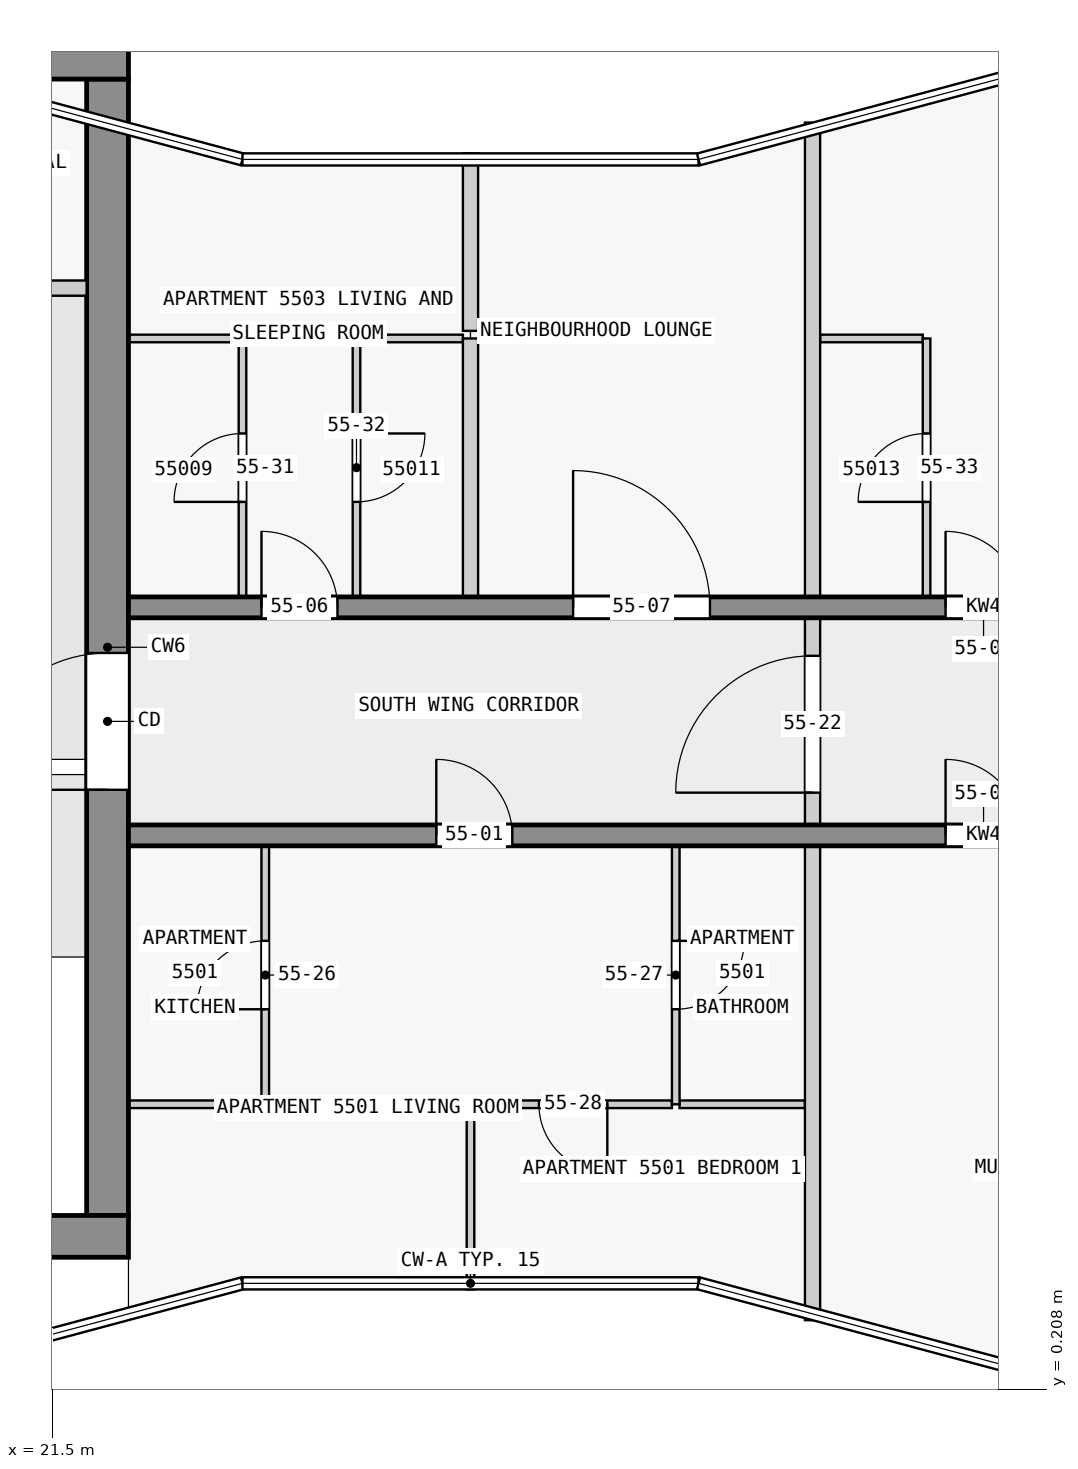
"""IFC4 building model, lengths in metres.
Left out: names, types, materials, properties, quantities, classifications, styles, units other than length and angle.
Written with IfcOpenShell. Run it as: python <this file> out.ifc"""

import sys

from ifc_helpers import new_model, si_unit, direction, frame, frame_2d, origin, place, context, subcontext, project, spatial, rectangle, extrude, element, fill, save


model = new_model("IFC4")
c1 = context("Model", 3, precision=1e-05, world=origin(), true_north=direction((0.0, 1.0)))
c2 = subcontext(c1, "Body", "Model", "MODEL_VIEW")
j1 = project(units=[si_unit("LENGTHUNIT", "METRE"), si_unit("PLANEANGLEUNIT", "RADIAN")], contexts=[c1])
p1 = place(None, origin())
s1 = spatial("IfcSite", under=j1, at=p1, CompositionType="ELEMENT")
p2 = place(p1, origin())
s2 = spatial("IfcBuilding", under=s1, at=p2, CompositionType="ELEMENT")
p3 = place(p2, frame((0.0, 0.0, 211.9)))
s3 = spatial("IfcBuildingStorey", under=s2, at=p3, CompositionType="ELEMENT", Elevation=211.9)
p4 = place(p3, frame((1.75, 2.225, 0.0), z_axis=(0.0, 0.0, 1.0), x_axis=(1.0, 0.0, 0.0)))
e1 = element("IfcWall", 1, at=p4, inside=s3, PredefinedType="SHEAR", context=c2, shape_type="SweptSolid", body=[
    extrude(rectangle(XDim=20.75, YDim=0.55, at=frame_2d((10.375, 0.0))), origin(), (0.0, 0.0, 1.0), 3.25),
])
p5 = place(p3, frame((1.38, 17.725, 0.0), z_axis=(0.0, 0.0, 1.0), x_axis=(1.0, 0.0, 0.0)))
e2 = element("IfcWall", 2, at=p5, inside=s3, PredefinedType="SHEAR", context=c2, shape_type="SweptSolid", body=[
    extrude(rectangle(XDim=21.12, YDim=0.55, at=frame_2d((10.56, 0.0))), origin(), (0.0, 0.0, 1.0), 3.25),
])
p6 = place(p5, frame((6.35, 0.0, 0.0)))
e3 = element("IfcOpeningElement", 3, at=p6, cuts=e2, PredefinedType="OPENING", context=c2, shape_type="SweptSolid", body=[
    extrude(rectangle(XDim=1.8, YDim=2.1, at=frame_2d((0.9, 1.05))), frame((0.0, 0.285, 0.0), z_axis=(0.0, -1.0, 0.0), x_axis=(1.0, 0.0, 0.0)), (0.0, 0.0, 1.0), 0.57),
])
p7 = place(p3, frame((22.225, 2.5, 0.0), z_axis=(0.0, 0.0, 1.0), x_axis=(0.0, 1.0, 0.0)))
e4 = element("IfcWall", 4, at=p7, inside=s3, PredefinedType="SHEAR", context=c2, shape_type="SweptSolid", body=[
    extrude(rectangle(XDim=14.95, YDim=0.55, at=frame_2d((7.475, 0.0))), origin(), (0.0, 0.0, 1.0), 3.25),
])
p8 = place(p7, frame((5.6, 0.0, 0.0)))
e5 = element("IfcOpeningElement", 5, at=p8, cuts=e4, PredefinedType="OPENING", context=c2, shape_type="SweptSolid", body=[
    extrude(rectangle(XDim=1.8, YDim=2.1, at=frame_2d((0.9, 1.05))), frame((0.0, 0.285, 0.0), z_axis=(0.0, -1.0, 0.0), x_axis=(1.0, 0.0, 0.0)), (0.0, 0.0, 1.0), 0.57),
])
p9 = place(p3, frame((22.5, 7.5, 0.0), z_axis=(0.0, 0.0, 1.0), x_axis=(1.0, 0.0, 0.0)))
e6 = element("IfcWall", 6, at=p9, inside=s3, PredefinedType="SHEAR", context=c2, shape_type="SweptSolid", body=[
    extrude(rectangle(XDim=22.5, YDim=0.275, at=frame_2d((11.25, 0.0))), origin(), (0.0, 0.0, 1.0), 3.25),
])
p10 = place(p9, frame((4.05, 0.0, 0.0)))
e7 = element("IfcOpeningElement", 7, at=p10, cuts=e6, PredefinedType="OPENING", context=c2, shape_type="SweptSolid", body=[
    extrude(rectangle(XDim=1.0, YDim=2.1, at=frame_2d((0.5, 1.05))), frame((0.0, 0.147, 0.0), z_axis=(0.0, -1.0, 0.0), x_axis=(1.0, 0.0, 0.0)), (0.0, 0.0, 1.0), 0.295),
])
p11 = place(p9, frame((10.75, 0.0, 0.0)))
e8 = element("IfcOpeningElement", 8, at=p11, cuts=e6, PredefinedType="OPENING", context=c2, shape_type="SweptSolid", body=[
    extrude(rectangle(XDim=1.0, YDim=2.1, at=frame_2d((0.5, 1.05))), frame((0.0, 0.147, 0.0), z_axis=(0.0, -1.0, 0.0), x_axis=(1.0, 0.0, 0.0)), (0.0, 0.0, 1.0), 0.295),
])
p12 = place(p9, frame((15.25, 0.0, 0.0)))
e9 = element("IfcOpeningElement", 9, at=p12, cuts=e6, PredefinedType="OPENING", context=c2, shape_type="SweptSolid", body=[
    extrude(rectangle(XDim=1.0, YDim=2.1, at=frame_2d((0.5, 1.05))), frame((0.0, 0.147, 0.0), z_axis=(0.0, -1.0, 0.0), x_axis=(1.0, 0.0, 0.0)), (0.0, 0.0, 1.0), 0.295),
])
p13 = place(p9, frame((18.75, 0.0, 0.0)))
e10 = element("IfcOpeningElement", 10, at=p13, cuts=e6, PredefinedType="OPENING", context=c2, shape_type="SweptSolid", body=[
    extrude(rectangle(XDim=0.9, YDim=2.1, at=frame_2d((0.45, 1.05))), frame((0.0, 0.147, 0.0), z_axis=(0.0, -1.0, 0.0), x_axis=(1.0, 0.0, 0.0)), (0.0, 0.0, 1.0), 0.295),
])
p14 = place(p9, frame((20.95, 0.0, 0.0)))
e11 = element("IfcOpeningElement", 11, at=p14, cuts=e6, PredefinedType="OPENING", context=c2, shape_type="SweptSolid", body=[
    extrude(rectangle(XDim=1.0, YDim=2.1, at=frame_2d((0.5, 1.05))), frame((0.0, 0.147, 0.0), z_axis=(0.0, -1.0, 0.0), x_axis=(1.0, 0.0, 0.0)), (0.0, 0.0, 1.0), 0.295),
])
p15 = place(p3, frame((22.5, 10.5, 0.0), z_axis=(0.0, 0.0, 1.0), x_axis=(1.0, 0.0, 0.0)))
e12 = element("IfcWall", 12, at=p15, inside=s3, PredefinedType="SHEAR", context=c2, shape_type="SweptSolid", body=[
    extrude(rectangle(XDim=22.5, YDim=0.275, at=frame_2d((11.25, 0.0))), origin(), (0.0, 0.0, 1.0), 3.25),
])
p16 = place(p15, frame((1.75, 0.0, 0.0)))
e13 = element("IfcOpeningElement", 13, at=p16, cuts=e12, PredefinedType="OPENING", context=c2, shape_type="SweptSolid", body=[
    extrude(rectangle(XDim=1.0, YDim=2.1, at=frame_2d((0.5, 1.05))), frame((0.0, 0.147, 0.0), z_axis=(0.0, -1.0, 0.0), x_axis=(1.0, 0.0, 0.0)), (0.0, 0.0, 1.0), 0.295),
])
p17 = place(p15, frame((5.85, 0.0, 0.0)))
e14 = element("IfcOpeningElement", 14, at=p17, cuts=e12, PredefinedType="OPENING", context=c2, shape_type="SweptSolid", body=[
    extrude(rectangle(XDim=1.8, YDim=2.1, at=frame_2d((0.9, 1.05))), frame((0.0, 0.147, 0.0), z_axis=(0.0, -1.0, 0.0), x_axis=(1.0, 0.0, 0.0)), (0.0, 0.0, 1.0), 0.295),
])
p18 = place(p15, frame((10.75, 0.0, 0.0)))
e15 = element("IfcOpeningElement", 15, at=p18, cuts=e12, PredefinedType="OPENING", context=c2, shape_type="SweptSolid", body=[
    extrude(rectangle(XDim=1.0, YDim=2.1, at=frame_2d((0.5, 1.05))), frame((0.0, 0.147, 0.0), z_axis=(0.0, -1.0, 0.0), x_axis=(1.0, 0.0, 0.0)), (0.0, 0.0, 1.0), 0.295),
])
p19 = place(p15, frame((16.85, 0.0, 0.0)))
e16 = element("IfcOpeningElement", 16, at=p19, cuts=e12, PredefinedType="OPENING", context=c2, shape_type="SweptSolid", body=[
    extrude(rectangle(XDim=1.0, YDim=2.1, at=frame_2d((0.5, 1.05))), frame((0.0, 0.147, 0.0), z_axis=(0.0, -1.0, 0.0), x_axis=(1.0, 0.0, 0.0)), (0.0, 0.0, 1.0), 0.295),
])
p20 = place(p3, frame((18.6, 14.7, 0.0), z_axis=(0.0, 0.0, 1.0), x_axis=(1.0, 0.0, 0.0)))
e17 = element("IfcWall", 17, at=p20, inside=s3, PredefinedType="PARTITIONING", context=c2, shape_type="SweptSolid", body=[
    extrude(rectangle(XDim=3.35, YDim=0.2, at=frame_2d((1.675, 0.0))), origin(), (0.0, 0.0, 1.0), 3.25),
])
p21 = place(p20, frame((0.15, 0.0, 0.0)))
e18 = element("IfcOpeningElement", 18, at=p21, cuts=e17, PredefinedType="OPENING", context=c2, shape_type="SweptSolid", body=[
    extrude(rectangle(XDim=0.9, YDim=2.1, at=frame_2d((0.45, 1.05))), frame((0.0, 0.11, 0.0), z_axis=(0.0, -1.0, 0.0), x_axis=(1.0, 0.0, 0.0)), (0.0, 0.0, 1.0), 0.22),
])
p22 = place(p20, frame((1.825, 0.0, 0.0)))
e19 = element("IfcOpeningElement", 19, at=p22, cuts=e17, PredefinedType="OPENING", context=c2, shape_type="SweptSolid", body=[
    extrude(rectangle(XDim=0.9, YDim=2.1, at=frame_2d((0.45, 1.05))), frame((0.0, 0.11, 0.0), z_axis=(0.0, -1.0, 0.0), x_axis=(1.0, 0.0, 0.0)), (0.0, 0.0, 1.0), 0.22),
])
p23 = place(p3, frame((29.65, 3.962, 0.0), z_axis=(0.0, 0.0, 1.0), x_axis=(-1.0, 0.0, 0.0)))
e20 = element("IfcWall", 20, at=p23, inside=s3, PredefinedType="PARTITIONING", context=c2, shape_type="SweptSolid", body=[
    extrude(rectangle(XDim=2.65, YDim=0.1, at=frame_2d((1.325, 0.0))), origin(), (0.0, 0.0, 1.0), 3.25),
])
p24 = place(p23, frame((0.85, 0.0, 0.0)))
e21 = element("IfcOpeningElement", 21, at=p24, cuts=e20, PredefinedType="OPENING", context=c2, shape_type="SweptSolid", body=[
    extrude(rectangle(XDim=0.9, YDim=2.1, at=frame_2d((0.45, 1.05))), frame((0.0, 0.06, 0.0), z_axis=(0.0, -1.0, 0.0), x_axis=(1.0, 0.0, 0.0)), (0.0, 0.0, 1.0), 0.12),
])
p25 = place(p3, frame((22.5, 3.962, 0.0), z_axis=(0.0, 0.0, 1.0), x_axis=(1.0, 0.0, 0.0)))
e22 = element("IfcWall", 22, at=p25, inside=s3, PredefinedType="PARTITIONING", context=c2, shape_type="SweptSolid", body=[
    extrude(rectangle(XDim=1.75, YDim=0.1, at=frame_2d((0.875, 0.0))), origin(), (0.0, 0.0, 1.0), 3.25),
])
p26 = place(p3, frame((29.75, 3.962, 0.0), z_axis=(0.0, 0.0, 1.0), x_axis=(1.0, 0.0, 0.0)))
e23 = element("IfcWall", 23, at=p26, inside=s3, PredefinedType="PARTITIONING", context=c2, shape_type="SweptSolid", body=[
    extrude(rectangle(XDim=1.65, YDim=0.1, at=frame_2d((0.825, 0.0))), origin(), (0.0, 0.0, 1.0), 3.25),
])
p27 = place(p3, frame((23.95, 14.038, 0.0), z_axis=(0.0, 0.0, 1.0), x_axis=(-1.0, 0.0, 0.0)))
e24 = element("IfcWall", 24, at=p27, inside=s3, PredefinedType="PARTITIONING", context=c2, shape_type="SweptSolid", body=[
    extrude(rectangle(XDim=1.45, YDim=0.1, at=frame_2d((0.725, 0.0))), origin(), (0.0, 0.0, 1.0), 3.25),
])
for number, where, z_axis, x_axis in (
    (25, (26.9, 14.038, 0.0), (0.0, 0.0, 1.0), (-1.0, 0.0, 0.0)),
    (26, (32.95, 14.038, 0.0), (0.0, 0.0, 1.0), (-1.0, 0.0, 0.0)),
):
    element("IfcWall", number, at=place(p3, frame(where, z_axis=z_axis, x_axis=x_axis)), inside=s3, PredefinedType="PARTITIONING", context=c2, shape_type="SweptSolid", body=[
        extrude(rectangle(XDim=1.35, YDim=0.1, at=frame_2d((0.675, 0.0))), origin(), (0.0, 0.0, 1.0), 3.25),
    ])
p28 = place(p3, frame((24.0, 10.637, 0.0), z_axis=(0.0, 0.0, 1.0), x_axis=(0.0, 1.0, 0.0)))
e27 = element("IfcWall", 27, at=p28, inside=s3, PredefinedType="PARTITIONING", context=c2, shape_type="SweptSolid", body=[
    extrude(rectangle(XDim=3.4, YDim=0.1, at=frame_2d((1.7, 0.0))), origin(), (0.0, 0.0, 1.0), 3.25),
])
p29 = place(p28, frame((1.25, 0.0, 0.0)))
e28 = element("IfcOpeningElement", 28, at=p29, cuts=e27, PredefinedType="OPENING", context=c2, shape_type="SweptSolid", body=[
    extrude(rectangle(XDim=0.9, YDim=2.1, at=frame_2d((0.45, 1.05))), frame((0.0, 0.06, 0.0), z_axis=(0.0, -1.0, 0.0), x_axis=(1.0, 0.0, 0.0)), (0.0, 0.0, 1.0), 0.12),
])
p30 = place(p3, frame((24.3, 3.962, 0.0), z_axis=(0.0, 0.0, 1.0), x_axis=(0.0, 1.0, 0.0)))
e29 = element("IfcWall", 29, at=p30, inside=s3, PredefinedType="PARTITIONING", context=c2, shape_type="SweptSolid", body=[
    extrude(rectangle(XDim=3.4, YDim=0.1, at=frame_2d((1.7, 0.0))), origin(), (0.0, 0.0, 1.0), 3.25),
])
p31 = place(p30, frame((1.25, 0.0, 0.0)))
e30 = element("IfcOpeningElement", 30, at=p31, cuts=e29, PredefinedType="OPENING", context=c2, shape_type="SweptSolid", body=[
    extrude(rectangle(XDim=0.9, YDim=2.1, at=frame_2d((0.45, 1.05))), frame((0.0, 0.06, 0.0), z_axis=(0.0, -1.0, 0.0), x_axis=(1.0, 0.0, 0.0)), (0.0, 0.0, 1.0), 0.12),
])
p32 = place(p3, frame((25.5, 14.038, 0.0), z_axis=(0.0, 0.0, 1.0), x_axis=(0.0, -1.0, 0.0)))
e31 = element("IfcWall", 31, at=p32, inside=s3, PredefinedType="PARTITIONING", context=c2, shape_type="SweptSolid", body=[
    extrude(rectangle(XDim=3.4, YDim=0.1, at=frame_2d((1.7, 0.0))), origin(), (0.0, 0.0, 1.0), 3.25),
])
p33 = place(p32, frame((1.25, 0.0, 0.0)))
e32 = element("IfcOpeningElement", 32, at=p33, cuts=e31, PredefinedType="OPENING", context=c2, shape_type="SweptSolid", body=[
    extrude(rectangle(XDim=0.9, YDim=2.1, at=frame_2d((0.45, 1.05))), frame((0.0, 0.06, 0.0), z_axis=(0.0, -1.0, 0.0), x_axis=(1.0, 0.0, 0.0)), (0.0, 0.0, 1.0), 0.12),
])
p34 = place(p3, frame((27.0, 3.913, 0.0), z_axis=(0.0, 0.0, 1.0), x_axis=(0.0, -1.0, 0.0)))
e33 = element("IfcWall", 33, at=p34, inside=s3, PredefinedType="PARTITIONING", context=c2, shape_type="SweptSolid", body=[
    extrude(rectangle(XDim=2.386, YDim=0.1, at=frame_2d((1.193, 0.0))), origin(), (0.0, 0.0, 1.0), 3.25),
])
p35 = place(p3, frame((27.0, 16.473, 0.0), z_axis=(0.0, 0.0, 1.0), x_axis=(0.0, -1.0, 0.0)))
e34 = element("IfcWall", 34, at=p35, inside=s3, PredefinedType="PARTITIONING", context=c2, shape_type="SweptSolid", body=[
    extrude(rectangle(XDim=2.336, YDim=0.2, at=frame_2d((1.168, 0.0))), origin(), (0.0, 0.0, 1.0), 3.25),
])
p36 = place(p3, frame((27.0, 10.637, 0.0), z_axis=(0.0, 0.0, 1.0), x_axis=(0.0, 1.0, 0.0)))
e35 = element("IfcWall", 35, at=p36, inside=s3, PredefinedType="PARTITIONING", context=c2, shape_type="SweptSolid", body=[
    extrude(rectangle(XDim=3.4, YDim=0.2, at=frame_2d((1.7, 0.0))), origin(), (0.0, 0.0, 1.0), 3.25),
])
p37 = place(p3, frame((29.7, 7.363, 0.0), z_axis=(0.0, 0.0, 1.0), x_axis=(0.0, -1.0, 0.0)))
e36 = element("IfcWall", 36, at=p37, inside=s3, PredefinedType="PARTITIONING", context=c2, shape_type="SweptSolid", body=[
    extrude(rectangle(XDim=3.4, YDim=0.1, at=frame_2d((1.7, 0.0))), origin(), (0.0, 0.0, 1.0), 3.25),
])
p38 = place(p37, frame((1.25, 0.0, 0.0)))
e37 = element("IfcOpeningElement", 37, at=p38, cuts=e36, PredefinedType="OPENING", context=c2, shape_type="SweptSolid", body=[
    extrude(rectangle(XDim=0.9, YDim=2.1, at=frame_2d((0.45, 1.05))), frame((0.0, 0.06, 0.0), z_axis=(0.0, -1.0, 0.0), x_axis=(1.0, 0.0, 0.0)), (0.0, 0.0, 1.0), 0.12),
])
for number, where, z_axis, x_axis in (
    (38, (31.5, 1.122, 0.0), (0.0, 0.0, 1.0), (0.0, 1.0, 0.0)),
    (39, (31.5, 10.637, 0.0), (0.0, 0.0, 1.0), (0.0, 1.0, 0.0)),
):
    element("IfcWall", number, at=place(p3, frame(where, z_axis=z_axis, x_axis=x_axis)), inside=s3, PredefinedType="PARTITIONING", context=c2, shape_type="SweptSolid", body=[
        extrude(rectangle(XDim=6.24, YDim=0.2, at=frame_2d((3.12, 0.0))), origin(), (0.0, 0.0, 1.0), 3.25),
    ])
p39 = place(p3, frame((33.0, 10.637, 0.0), z_axis=(0.0, 0.0, 1.0), x_axis=(0.0, 1.0, 0.0)))
e40 = element("IfcWall", 40, at=p39, inside=s3, PredefinedType="PARTITIONING", context=c2, shape_type="SweptSolid", body=[
    extrude(rectangle(XDim=3.4, YDim=0.1, at=frame_2d((1.7, 0.0))), origin(), (0.0, 0.0, 1.0), 3.25),
])
p40 = place(p39, frame((1.25, 0.0, 0.0)))
e41 = element("IfcOpeningElement", 41, at=p40, cuts=e40, PredefinedType="OPENING", context=c2, shape_type="SweptSolid", body=[
    extrude(rectangle(XDim=0.9, YDim=2.1, at=frame_2d((0.45, 1.05))), frame((0.0, 0.06, 0.0), z_axis=(0.0, -1.0, 0.0), x_axis=(1.0, 0.0, 0.0)), (0.0, 0.0, 1.0), 0.12),
])
p41 = place(p3, frame((31.5, 7.462, 0.0), z_axis=(0.0, 0.0, 1.0), x_axis=(0.0, 1.0, 0.0)))
e42 = element("IfcWall", 42, at=p41, inside=s3, PredefinedType="PARTITIONING", context=c2, shape_type="SweptSolid", body=[
    extrude(rectangle(XDim=3.075, YDim=0.2, at=frame_2d((1.538, 0.0))), origin(), (0.0, 0.0, 1.0), 3.25),
])
p42 = place(p41, frame((0.6, 0.0, 0.0)))
e43 = element("IfcOpeningElement", 43, at=p42, cuts=e42, PredefinedType="OPENING", context=c2, shape_type="SweptSolid", body=[
    extrude(rectangle(XDim=1.8, YDim=2.1, at=frame_2d((0.9, 1.05))), frame((0.0, 0.11, 0.0), z_axis=(0.0, -1.0, 0.0), x_axis=(1.0, 0.0, 0.0)), (0.0, 0.0, 1.0), 0.22),
])
p43 = place(p8, origin())
e44 = element("IfcDoor", 44, at=p43, inside=s3, OperationType="DOUBLE_DOOR_SINGLE_SWING", PredefinedType="DOOR", context=c2, shape_type="SweptSolid", body=[
    extrude(rectangle(XDim=1.8, YDim=2.1, at=frame_2d((0.9, 1.05))), frame((0.0, 0.025, 0.0), z_axis=(0.0, -1.0, 0.0), x_axis=(1.0, 0.0, 0.0)), (0.0, 0.0, 1.0), 0.05),
])
fill(e5, e44)
p44 = place(p10, origin())
e45 = element("IfcDoor", 45, at=p44, inside=s3, OperationType="SINGLE_SWING_LEFT", PredefinedType="DOOR", context=c2, shape_type="SweptSolid", body=[
    extrude(rectangle(XDim=1.0, YDim=2.1, at=frame_2d((0.5, 1.05))), frame((0.0, 0.025, 0.0), z_axis=(0.0, -1.0, 0.0), x_axis=(1.0, 0.0, 0.0)), (0.0, 0.0, 1.0), 0.05),
])
fill(e7, e45)
p45 = place(p11, origin())
e46 = element("IfcDoor", 46, at=p45, inside=s3, OperationType="SINGLE_SWING_LEFT", PredefinedType="DOOR", context=c2, shape_type="SweptSolid", body=[
    extrude(rectangle(XDim=1.0, YDim=2.1, at=frame_2d((0.5, 1.05))), frame((0.0, 0.025, 0.0), z_axis=(0.0, -1.0, 0.0), x_axis=(1.0, 0.0, 0.0)), (0.0, 0.0, 1.0), 0.05),
])
fill(e8, e46)
p46 = place(p16, origin())
e47 = element("IfcDoor", 47, at=p46, inside=s3, OperationType="SINGLE_SWING_LEFT", PredefinedType="DOOR", context=c2, shape_type="SweptSolid", body=[
    extrude(rectangle(XDim=1.0, YDim=2.1, at=frame_2d((0.5, 1.05))), frame((0.0, 0.025, 0.0), z_axis=(0.0, -1.0, 0.0), x_axis=(1.0, 0.0, 0.0)), (0.0, 0.0, 1.0), 0.05),
])
fill(e13, e47)
p47 = place(p17, origin())
e48 = element("IfcDoor", 48, at=p47, inside=s3, OperationType="SINGLE_SWING_LEFT", PredefinedType="DOOR", context=c2, shape_type="SweptSolid", body=[
    extrude(rectangle(XDim=1.8, YDim=2.1, at=frame_2d((0.9, 1.05))), frame((0.0, 0.025, 0.0), z_axis=(0.0, -1.0, 0.0), x_axis=(1.0, 0.0, 0.0)), (0.0, 0.0, 1.0), 0.05),
])
fill(e14, e48)
p48 = place(p18, origin())
e49 = element("IfcDoor", 49, at=p48, inside=s3, OperationType="SINGLE_SWING_LEFT", PredefinedType="DOOR", context=c2, shape_type="SweptSolid", body=[
    extrude(rectangle(XDim=1.0, YDim=2.1, at=frame_2d((0.5, 1.05))), frame((0.0, 0.025, 0.0), z_axis=(0.0, -1.0, 0.0), x_axis=(1.0, 0.0, 0.0)), (0.0, 0.0, 1.0), 0.05),
])
fill(e15, e49)
p49 = place(p42, origin())
e50 = element("IfcDoor", 50, at=p49, inside=s3, OperationType="SINGLE_SWING_LEFT", PredefinedType="DOOR", context=c2, shape_type="SweptSolid", body=[
    extrude(rectangle(XDim=1.8, YDim=2.1, at=frame_2d((0.9, 1.05))), frame((0.0, 0.025, 0.0), z_axis=(0.0, -1.0, 0.0), x_axis=(1.0, 0.0, 0.0)), (0.0, 0.0, 1.0), 0.05),
])
fill(e43, e50)
p50 = place(p31, origin())
e51 = element("IfcDoor", 51, at=p50, inside=s3, OperationType="SINGLE_SWING_LEFT", PredefinedType="DOOR", context=c2, shape_type="SweptSolid", body=[
    extrude(rectangle(XDim=0.9, YDim=2.1, at=frame_2d((0.45, 1.05))), frame((0.0, 0.025, 0.0), z_axis=(0.0, -1.0, 0.0), x_axis=(1.0, 0.0, 0.0)), (0.0, 0.0, 1.0), 0.05),
])
fill(e30, e51)
p51 = place(p38, origin())
e52 = element("IfcDoor", 52, at=p51, inside=s3, OperationType="SINGLE_SWING_LEFT", PredefinedType="DOOR", context=c2, shape_type="SweptSolid", body=[
    extrude(rectangle(XDim=0.9, YDim=2.1, at=frame_2d((0.45, 1.05))), frame((0.0, 0.025, 0.0), z_axis=(0.0, -1.0, 0.0), x_axis=(1.0, 0.0, 0.0)), (0.0, 0.0, 1.0), 0.05),
])
fill(e37, e52)
p52 = place(p24, origin())
e53 = element("IfcDoor", 53, at=p52, inside=s3, OperationType="SINGLE_SWING_LEFT", PredefinedType="DOOR", context=c2, shape_type="SweptSolid", body=[
    extrude(rectangle(XDim=0.9, YDim=2.1, at=frame_2d((0.45, 1.05))), frame((0.0, 0.025, 0.0), z_axis=(0.0, -1.0, 0.0), x_axis=(1.0, 0.0, 0.0)), (0.0, 0.0, 1.0), 0.05),
])
fill(e21, e53)
p53 = place(p29, origin())
e54 = element("IfcDoor", 54, at=p53, inside=s3, OperationType="SINGLE_SWING_LEFT", PredefinedType="DOOR", context=c2, shape_type="SweptSolid", body=[
    extrude(rectangle(XDim=0.9, YDim=2.1, at=frame_2d((0.45, 1.05))), frame((0.0, 0.025, 0.0), z_axis=(0.0, -1.0, 0.0), x_axis=(1.0, 0.0, 0.0)), (0.0, 0.0, 1.0), 0.05),
])
fill(e28, e54)
p54 = place(p33, origin())
e55 = element("IfcDoor", 55, at=p54, inside=s3, OperationType="SINGLE_SWING_LEFT", PredefinedType="DOOR", context=c2, shape_type="SweptSolid", body=[
    extrude(rectangle(XDim=0.9, YDim=2.1, at=frame_2d((0.45, 1.05))), frame((0.0, 0.025, 0.0), z_axis=(0.0, -1.0, 0.0), x_axis=(1.0, 0.0, 0.0)), (0.0, 0.0, 1.0), 0.05),
])
fill(e32, e55)
p55 = place(p40, origin())
e56 = element("IfcDoor", 56, at=p55, inside=s3, OperationType="SINGLE_SWING_LEFT", PredefinedType="DOOR", context=c2, shape_type="SweptSolid", body=[
    extrude(rectangle(XDim=0.9, YDim=2.1, at=frame_2d((0.45, 1.05))), frame((0.0, 0.025, 0.0), z_axis=(0.0, -1.0, 0.0), x_axis=(1.0, 0.0, 0.0)), (0.0, 0.0, 1.0), 0.05),
])
fill(e41, e56)
save(model, sys.argv[1])
